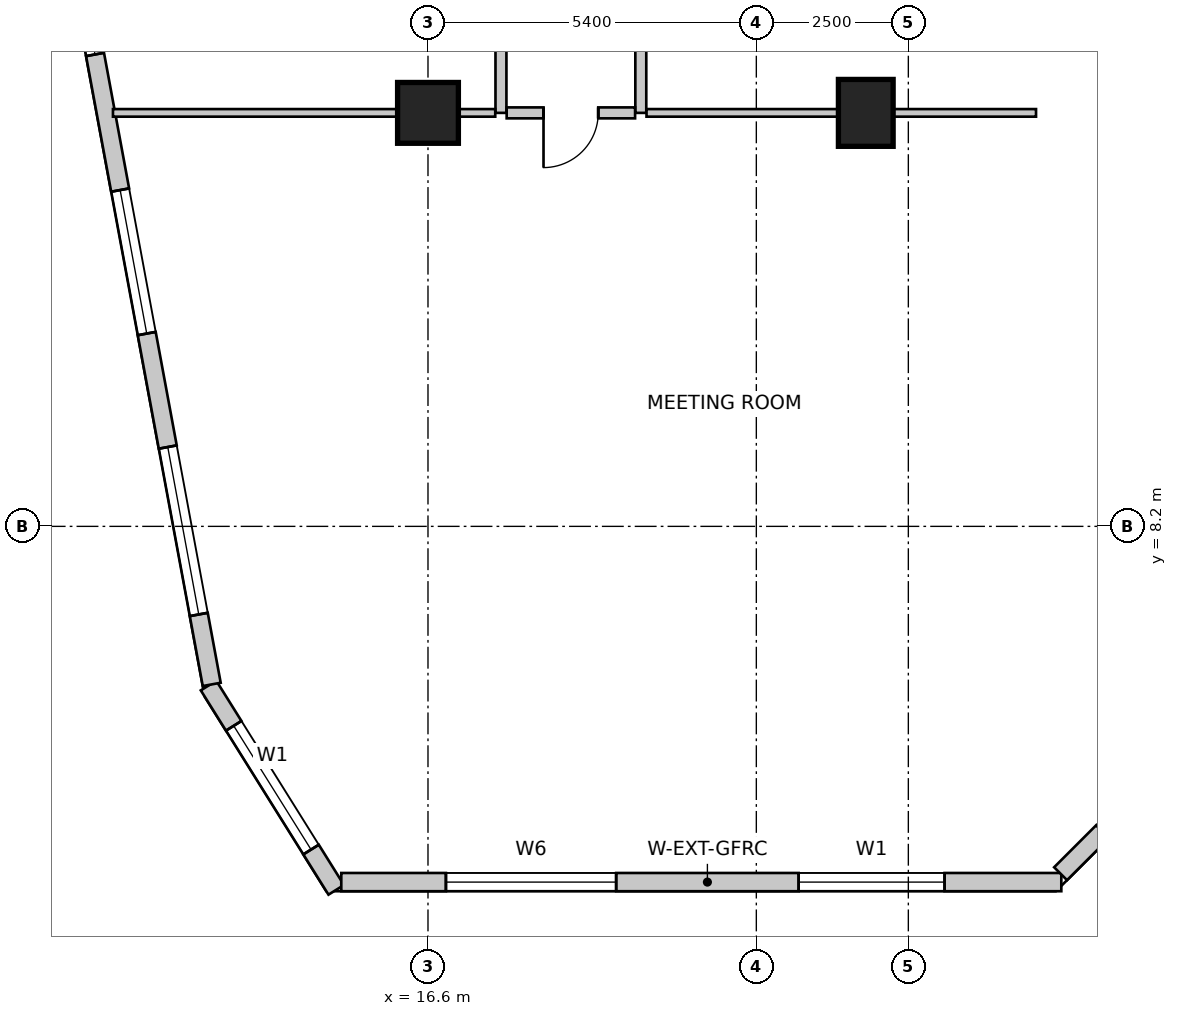
"""IFC4 building model, lengths in metres.
Left out: names, types, materials, properties, quantities, classifications, styles, units other than length and angle.
Written with IfcOpenShell. Run it as: python <this file> out.ifc"""

import sys

from ifc_helpers import new_model, si_unit, direction, frame, frame_2d, origin, origin_2d, place, context, subcontext, project, spatial, rectangle, extrude, source, transform, mapped, element, fill, save


model = new_model("IFC4")
c1 = context("Model", 3, precision=1e-05, world=origin(), true_north=direction((0.0, 1.0)))
c2 = subcontext(c1, "Body", "Model", "MODEL_VIEW")
j1 = project(units=[si_unit("LENGTHUNIT", "METRE"), si_unit("PLANEANGLEUNIT", "RADIAN")], contexts=[c1])
p1 = place(None, origin())
s1 = spatial("IfcSite", under=j1, at=p1, CompositionType="ELEMENT")
p2 = place(p1, origin())
s2 = spatial("IfcBuilding", under=s1, at=p2, CompositionType="ELEMENT")
p3 = place(p2, frame((0.0, 0.0, 43.0)))
s3 = spatial("IfcBuildingStorey", under=s2, at=p3, CompositionType="ELEMENT", Elevation=43.0)
m1 = source(origin(), c2, "Body", "SweptSolid", [
    extrude(rectangle(XDim=0.9, YDim=1.1, at=origin_2d()), origin(), (0.0, 0.0, 1.0), 4.0),
])
p4 = place(p3, frame((23.8, 15.0, 0.0), z_axis=(0.0, 0.0, 1.0), x_axis=(1.0, 0.0, 0.0)))
e1 = element("IfcColumn", 1, at=p4, inside=s3, PredefinedType="COLUMN", context=c2, shape_type="MappedRepresentation", body=[
    mapped(m1, transform((0.0, 0.0, 0.0), scale=1.0)),
])
m2 = source(origin(), c2, "Body", "SweptSolid", [
    extrude(rectangle(XDim=1.0, YDim=1.0, at=origin_2d()), origin(), (0.0, 0.0, 1.0), 4.0),
])
p5 = place(p3, frame((16.6, 15.0, 0.0), z_axis=(0.0, 0.0, 1.0), x_axis=(1.0, 0.0, 0.0)))
e2 = element("IfcColumn", 2, at=p5, inside=s3, PredefinedType="COLUMN", context=c2, shape_type="MappedRepresentation", body=[
    mapped(m2, transform((0.0, 0.0, 0.0), scale=1.0)),
])
p6 = place(p3, frame((12.991, 5.583, 0.0), z_axis=(0.0, 0.0, 1.0), x_axis=(0.530015557218, -0.847987918019, 0.0)))
e3 = element("IfcWall", 3, at=p6, inside=s3, PredefinedType="SOLIDWALL", context=c2, shape_type="SweptSolid", body=[
    extrude(rectangle(XDim=3.962, YDim=0.3, at=frame_2d((1.981, 0.0))), origin(), (0.0, 0.0, 1.0), 3.75),
])
m3 = source(origin(), c2, "Body", "SweptSolid", [
    extrude(rectangle(XDim=2.4, YDim=2.2, at=frame_2d((1.2, 1.1))), frame((0.0, 0.16, 0.0), z_axis=(0.0, -1.0, 0.0), x_axis=(1.0, 0.0, 0.0)), (0.0, 0.0, 1.0), 0.32),
])
p7 = place(p6, frame((0.781, 0.0, 0.85)))
e4 = element("IfcOpeningElement", 4, at=p7, cuts=e3, PredefinedType="OPENING", context=c2, shape_type="MappedRepresentation", body=[
    mapped(m3, transform((0.0, 0.0, 0.0), scale=1.0)),
])
p8 = place(p3, frame((15.174, 2.35, 0.0), z_axis=(0.0, 0.0, 1.0), x_axis=(1.0, 0.0, 0.0)))
e5 = element("IfcWall", 5, at=p8, inside=s3, PredefinedType="SOLIDWALL", context=c2, shape_type="SweptSolid", body=[
    extrude(rectangle(XDim=11.842, YDim=0.3, at=frame_2d((5.921, 0.0))), origin(), (0.0, 0.0, 1.0), 3.75),
])
m4 = source(origin(), c2, "Body", "SweptSolid", [
    extrude(rectangle(XDim=2.8, YDim=2.4, at=frame_2d((1.4, 1.2))), frame((0.0, 0.16, 0.0), z_axis=(0.0, -1.0, 0.0), x_axis=(1.0, 0.0, 0.0)), (0.0, 0.0, 1.0), 0.32),
])
p9 = place(p8, frame((1.721, 0.0, 0.85)))
e6 = element("IfcOpeningElement", 6, at=p9, cuts=e5, PredefinedType="OPENING", context=c2, shape_type="MappedRepresentation", body=[
    mapped(m4, transform((0.0, 0.0, 0.0), scale=1.0)),
])
p10 = place(p8, frame((7.522, 0.0, 0.85)))
e7 = element("IfcOpeningElement", 7, at=p10, cuts=e5, PredefinedType="OPENING", context=c2, shape_type="MappedRepresentation", body=[
    mapped(m3, transform((0.0, 0.0, 0.0), scale=1.0)),
])
p11 = place(p3, frame((27.004, 2.488, 0.0), z_axis=(0.0, 0.0, 1.0), x_axis=(0.707106781187, 0.707106781187, 0.0)))
e8 = element("IfcWall", 8, at=p11, inside=s3, PredefinedType="SOLIDWALL", context=c2, shape_type="SweptSolid", body=[
    extrude(rectangle(XDim=4.356, YDim=0.3, at=frame_2d((2.178, 0.0))), origin(), (0.0, 0.0, 1.0), 3.75),
])
p12 = place(p11, frame((0.978, 0.0, 0.85)))
e9 = element("IfcOpeningElement", 9, at=p12, cuts=e8, PredefinedType="OPENING", context=c2, shape_type="MappedRepresentation", body=[
    mapped(m3, transform((0.0, 0.0, 0.0), scale=1.0)),
])
p13 = place(p3, frame((8.183, 31.833, 0.0), z_axis=(0.0, 0.0, 1.0), x_axis=(0.18216364648, -0.983268226834, 0.0)))
e10 = element("IfcWall", 10, at=p13, inside=s3, PredefinedType="SOLIDWALL", context=c2, shape_type="SweptSolid", body=[
    extrude(rectangle(XDim=26.678, YDim=0.3, at=frame_2d((13.339, 0.0))), origin(), (0.0, 0.0, 1.0), 3.75),
])
p14 = place(p13, frame((3.152, 0.0, 0.85)))
e11 = element("IfcOpeningElement", 11, at=p14, cuts=e10, PredefinedType="OPENING", context=c2, shape_type="MappedRepresentation", body=[
    mapped(m3, transform((0.0, 0.0, 0.0), scale=1.0)),
])
p15 = place(p13, frame((9.186, 0.0, 0.85)))
e12 = element("IfcOpeningElement", 12, at=p15, cuts=e10, PredefinedType="OPENING", context=c2, shape_type="MappedRepresentation", body=[
    mapped(m3, transform((0.0, 0.0, 0.0), scale=1.0)),
])
p16 = place(p13, frame((13.343, 0.0, 0.85)))
e13 = element("IfcOpeningElement", 13, at=p16, cuts=e10, PredefinedType="OPENING", context=c2, shape_type="MappedRepresentation", body=[
    mapped(m4, transform((0.0, 0.0, 0.0), scale=1.0)),
])
p17 = place(p13, frame((18.411, 0.0, 0.85)))
e14 = element("IfcOpeningElement", 14, at=p17, cuts=e10, PredefinedType="OPENING", context=c2, shape_type="MappedRepresentation", body=[
    mapped(m3, transform((0.0, 0.0, 0.0), scale=1.0)),
])
p18 = place(p13, frame((22.709, 0.0, 0.85)))
e15 = element("IfcOpeningElement", 15, at=p18, cuts=e10, PredefinedType="OPENING", context=c2, shape_type="MappedRepresentation", body=[
    mapped(m4, transform((0.0, 0.0, 0.0), scale=1.0)),
])
p19 = place(p3, frame((17.8, 15.0, 0.0), z_axis=(0.0, 0.0, 1.0), x_axis=(0.0, 1.0, 0.0)))
e16 = element("IfcWall", 16, at=p19, inside=s3, PredefinedType="PARTITIONING", context=c2, shape_type="SweptSolid", body=[
    extrude(rectangle(XDim=8.838, YDim=0.18, at=frame_2d((4.419, 0.0))), origin(), (0.0, 0.0, 1.0), 2.892),
])
m5 = source(origin(), c2, "Body", "SweptSolid", [
    extrude(rectangle(XDim=0.9, YDim=2.15, at=frame_2d((0.45, 1.075))), frame((0.0, 0.1, 0.0), z_axis=(0.0, -1.0, 0.0), x_axis=(1.0, 0.0, 0.0)), (0.0, 0.0, 1.0), 0.2),
])
p20 = place(p19, frame((3.908, 0.0, 0.0)))
e17 = element("IfcOpeningElement", 17, at=p20, cuts=e16, PredefinedType="OPENING", context=c2, shape_type="MappedRepresentation", body=[
    mapped(m5, transform((0.0, 0.0, 0.0), scale=1.0)),
])
p21 = place(p3, frame((20.1, 31.056, 0.0), z_axis=(0.0, 0.0, 1.0), x_axis=(0.0, -1.0, 0.0)))
e18 = element("IfcWall", 18, at=p21, inside=s3, PredefinedType="PARTITIONING", context=c2, shape_type="SweptSolid", body=[
    extrude(rectangle(XDim=16.056, YDim=0.18, at=frame_2d((8.028, 0.0))), origin(), (0.0, 0.0, 1.0), 2.892),
])
p22 = place(p21, frame((7.518, 0.0, 0.0)))
e19 = element("IfcOpeningElement", 19, at=p22, cuts=e18, PredefinedType="OPENING", context=c2, shape_type="MappedRepresentation", body=[
    mapped(m5, transform((0.0, 0.0, 0.0), scale=1.0)),
])
p23 = place(p3, frame((20.006, 15.0, 0.0), z_axis=(0.0, 0.0, 1.0), x_axis=(-1.0, 0.0, 0.0)))
e20 = element("IfcWall", 20, at=p23, inside=s3, PredefinedType="PARTITIONING", context=c2, shape_type="SweptSolid", body=[
    extrude(rectangle(XDim=2.112, YDim=0.18, at=frame_2d((1.056, 0.0))), origin(), (0.0, 0.0, 1.0), 2.892),
])
p24 = place(p23, frame((0.606, 0.0, 0.0)))
e21 = element("IfcOpeningElement", 21, at=p24, cuts=e20, PredefinedType="OPENING", context=c2, shape_type="MappedRepresentation", body=[
    mapped(m5, transform((0.0, 0.0, 0.0), scale=1.0)),
])
p25 = place(p3, frame((17.706, 15.0, 0.0), z_axis=(0.0, 0.0, 1.0), x_axis=(-1.0, 0.0, 0.0)))
e22 = element("IfcWall", 22, at=p25, inside=s3, PredefinedType="PARTITIONING", context=c2, shape_type="SweptSolid", body=[
    extrude(rectangle(XDim=6.287, YDim=0.125, at=frame_2d((3.144, 0.0))), origin(), (0.0, 0.0, 1.0), 2.892),
])
p26 = place(p3, frame((26.6, 15.0, 0.0), z_axis=(0.0, 0.0, 1.0), x_axis=(-1.0, 0.0, 0.0)))
e23 = element("IfcWall", 23, at=p26, inside=s3, PredefinedType="PARTITIONING", context=c2, shape_type="SweptSolid", body=[
    extrude(rectangle(XDim=6.406, YDim=0.125, at=frame_2d((3.203, 0.0))), origin(), (0.0, 0.0, 1.0), 2.892),
])
m6 = source(origin(), c2, "Body", "SweptSolid", [
    extrude(rectangle(XDim=2.4, YDim=2.2, at=frame_2d((1.2, 1.1))), frame((0.0, -0.015, 0.0), z_axis=(0.0, -1.0, 0.0), x_axis=(1.0, 0.0, 0.0)), (0.0, 0.0, 1.0), 0.06),
])
p27 = place(p7, origin())
e24 = element("IfcWindow", 24, at=p27, inside=s3, PartitioningType="SINGLE_PANEL", PredefinedType="WINDOW", context=c2, shape_type="MappedRepresentation", body=[
    mapped(m6, transform((0.0, 0.0, 0.0), scale=1.0)),
])
fill(e4, e24)
m7 = source(origin(), c2, "Body", "SweptSolid", [
    extrude(rectangle(XDim=2.8, YDim=2.4, at=frame_2d((1.4, 1.2))), frame((0.0, -0.015, 0.0), z_axis=(0.0, -1.0, 0.0), x_axis=(1.0, 0.0, 0.0)), (0.0, 0.0, 1.0), 0.06),
])
p28 = place(p9, origin())
e25 = element("IfcWindow", 25, at=p28, inside=s3, PartitioningType="SINGLE_PANEL", PredefinedType="WINDOW", context=c2, shape_type="MappedRepresentation", body=[
    mapped(m7, transform((0.0, 0.0, 0.0), scale=1.0)),
])
fill(e6, e25)
p29 = place(p10, origin())
e26 = element("IfcWindow", 26, at=p29, inside=s3, PartitioningType="SINGLE_PANEL", PredefinedType="WINDOW", context=c2, shape_type="MappedRepresentation", body=[
    mapped(m6, transform((0.0, 0.0, 0.0), scale=1.0)),
])
fill(e7, e26)
p30 = place(p16, origin())
e27 = element("IfcWindow", 27, at=p30, inside=s3, PartitioningType="SINGLE_PANEL", PredefinedType="WINDOW", context=c2, shape_type="MappedRepresentation", body=[
    mapped(m7, transform((0.0, 0.0, 0.0), scale=1.0)),
])
fill(e13, e27)
p31 = place(p17, origin())
e28 = element("IfcWindow", 28, at=p31, inside=s3, PartitioningType="SINGLE_PANEL", PredefinedType="WINDOW", context=c2, shape_type="MappedRepresentation", body=[
    mapped(m6, transform((0.0, 0.0, 0.0), scale=1.0)),
])
fill(e14, e28)
p32 = place(p18, origin())
e29 = element("IfcWindow", 29, at=p32, inside=s3, PartitioningType="SINGLE_PANEL", PredefinedType="WINDOW", context=c2, shape_type="MappedRepresentation", body=[
    mapped(m7, transform((0.0, 0.0, 0.0), scale=1.0)),
])
fill(e15, e29)
m8 = source(origin(), c2, "Body", "SweptSolid", [
    extrude(rectangle(XDim=0.9, YDim=2.15, at=frame_2d((0.45, 1.075))), frame((0.0, 0.025, 0.0), z_axis=(0.0, -1.0, 0.0), x_axis=(1.0, 0.0, 0.0)), (0.0, 0.0, 1.0), 0.05),
])
p33 = place(p24, origin())
e30 = element("IfcDoor", 30, at=p33, inside=s3, OperationType="SINGLE_SWING_RIGHT", PredefinedType="DOOR", context=c2, shape_type="MappedRepresentation", body=[
    mapped(m8, transform((0.0, 0.0, 0.0), scale=1.0)),
])
fill(e21, e30)
save(model, sys.argv[1])
